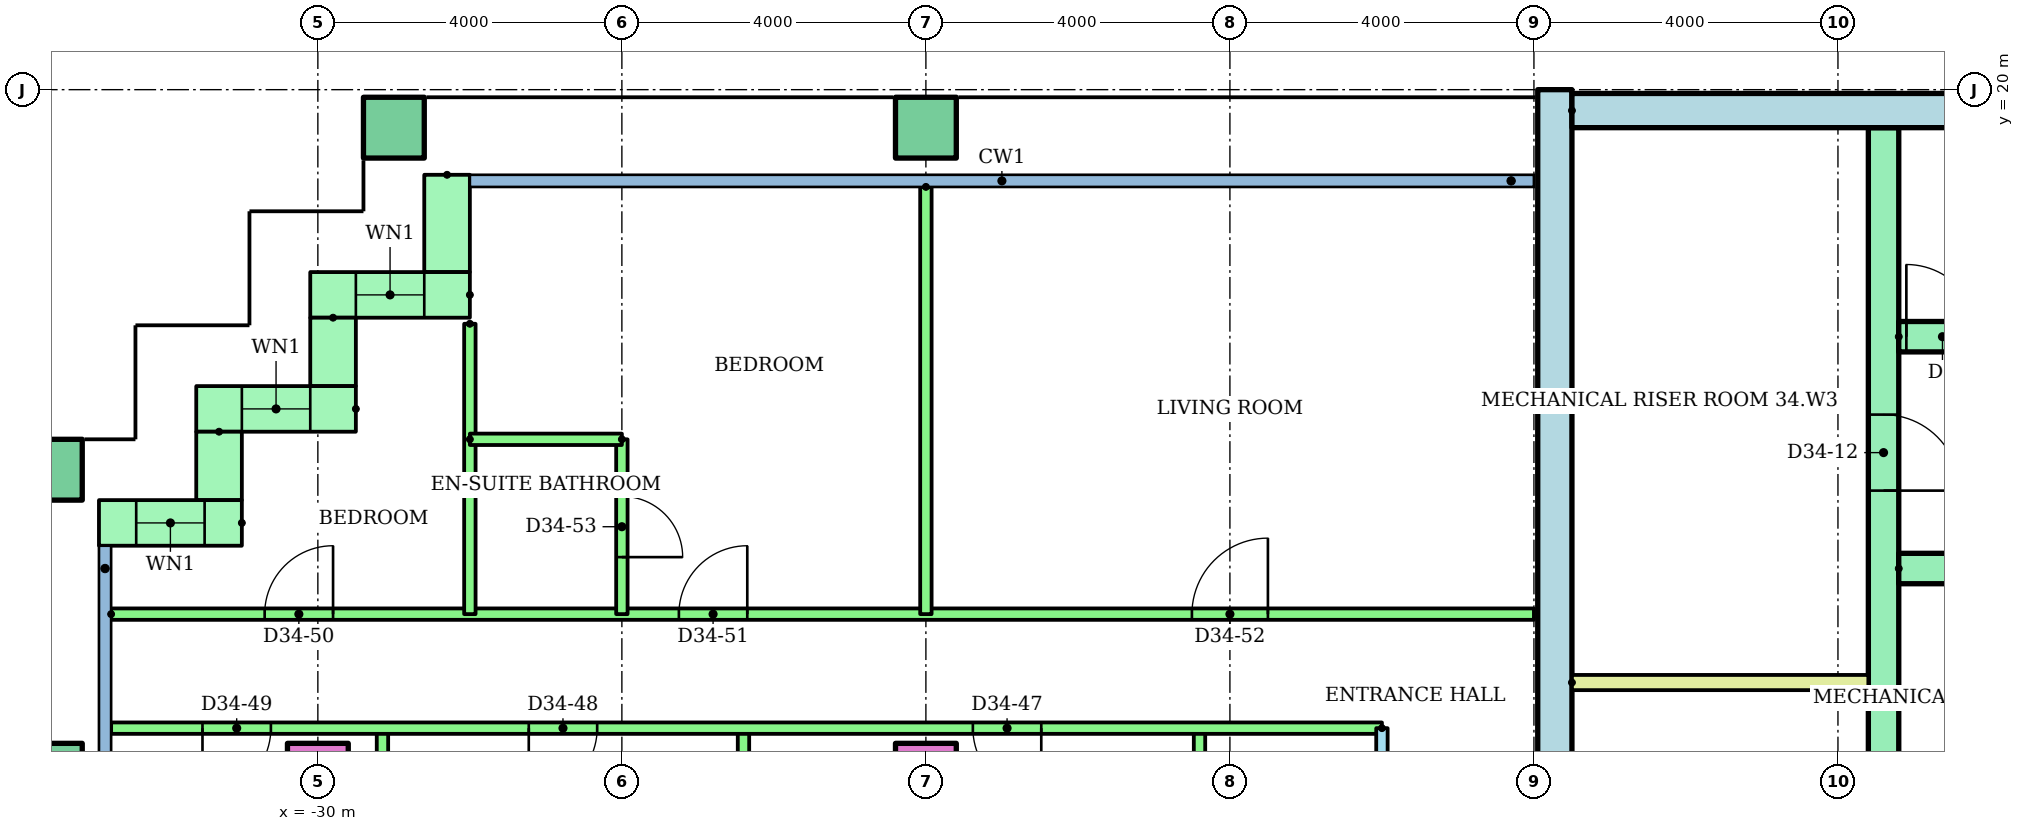
"""IFC4 building model, lengths in metres.
Left out: names, types, materials, properties, quantities, classifications, styles, units other than length and angle.
Written with IfcOpenShell. Run it as: python <this file> out.ifc"""

import sys

from ifc_helpers import new_model, si_unit, direction, frame, frame_2d, origin, origin_2d, place, context, subcontext, project, spatial, rectangle, hollow_rectangle, extrude, element, fill, save


model = new_model("IFC4")
c1 = context("Model", 3, precision=1e-05, world=origin(), true_north=direction((0.0, 1.0)))
c2 = subcontext(c1, "Body", "Model", "MODEL_VIEW")
j1 = project(units=[si_unit("LENGTHUNIT", "METRE"), si_unit("PLANEANGLEUNIT", "RADIAN")], contexts=[c1])
p1 = place(None, origin())
s1 = spatial("IfcSite", under=j1, at=p1, CompositionType="ELEMENT")
p2 = place(p1, origin())
s2 = spatial("IfcBuilding", under=s1, at=p2, CompositionType="ELEMENT")
p3 = place(p2, frame((0.0, 0.0, 132.6)))
s3 = spatial("IfcBuildingStorey", under=s2, at=p3, CompositionType="ELEMENT", Elevation=132.6)
p4 = place(p3, frame((-33.5, 11.0, 0.0)))
e1 = element("IfcColumn", 1, at=p4, inside=s3, PredefinedType="COLUMN", context=c2, shape_type="SweptSolid", body=[
    extrude(hollow_rectangle(XDim=0.8, YDim=0.8, WallThickness=0.04, at=origin_2d()), origin(), (0.0, 0.0, 1.0), 3.2),
])
for number, where in (
    (2, (-30.0, 11.0, 0.0)),
    (3, (-22.0, 11.0, 0.0)),
):
    element("IfcColumn", number, at=place(p3, frame(where)), inside=s3, PredefinedType="COLUMN", context=c2, shape_type="SweptSolid", body=[
        extrude(rectangle(XDim=0.8, YDim=0.8, at=origin_2d()), origin(), (0.0, 0.0, 1.0), 3.2),
    ])
for number, where in (
    (4, (-33.5, 15.0, 0.0)),
    (5, (-29.0, 19.5, 0.0)),
    (6, (-22.0, 19.5, 0.0)),
):
    element("IfcColumn", number, at=place(p3, frame(where)), inside=s3, PredefinedType="COLUMN", context=c2, shape_type="SweptSolid", body=[
        extrude(hollow_rectangle(XDim=0.8, YDim=0.8, WallThickness=0.04, at=origin_2d()), origin(), (0.0, 0.0, 1.0), 3.2),
    ])
p5 = place(p3, frame((-28.3, 18.88, 0.0), z_axis=(0.0, 0.0, 1.0), x_axis=(0.0, -1.0, 0.0)))
e7 = element("IfcWall", 7, at=p5, inside=s3, PredefinedType="STANDARD", context=c2, shape_type="SweptSolid", body=[
    extrude(rectangle(XDim=1.28, YDim=0.6, at=frame_2d((0.64, 0.0))), origin(), (0.0, 0.0, 1.0), 2.92),
])
p6 = place(p3, frame((-28.0, 17.3, 0.0), z_axis=(0.0, 0.0, 1.0), x_axis=(-1.0, 0.0, 0.0)))
e8 = element("IfcWall", 8, at=p6, inside=s3, PredefinedType="STANDARD", context=c2, shape_type="SweptSolid", body=[
    extrude(rectangle(XDim=2.1, YDim=0.6, at=frame_2d((1.05, 0.0))), origin(), (0.0, 0.0, 1.0), 2.92),
])
p7 = place(p6, frame((0.6, 0.0, 0.9)))
e9 = element("IfcOpeningElement", 9, at=p7, cuts=e8, PredefinedType="OPENING", context=c2, shape_type="SweptSolid", body=[
    extrude(rectangle(XDim=0.9, YDim=1.5, at=frame_2d((0.45, 0.75))), frame((0.0, 0.31, 0.0), z_axis=(0.0, -1.0, 0.0), x_axis=(1.0, 0.0, 0.0)), (0.0, 0.0, 1.0), 0.62),
])
p8 = place(p3, frame((-29.8, 17.0, 0.0), z_axis=(0.0, 0.0, 1.0), x_axis=(0.0, -1.0, 0.0)))
e10 = element("IfcWall", 10, at=p8, inside=s3, PredefinedType="STANDARD", context=c2, shape_type="SweptSolid", body=[
    extrude(rectangle(XDim=0.9, YDim=0.6, at=frame_2d((0.45, 0.0))), origin(), (0.0, 0.0, 1.0), 2.92),
])
p9 = place(p3, frame((-29.5, 15.8, 0.0), z_axis=(0.0, 0.0, 1.0), x_axis=(-1.0, 0.0, 0.0)))
e11 = element("IfcWall", 11, at=p9, inside=s3, PredefinedType="STANDARD", context=c2, shape_type="SweptSolid", body=[
    extrude(rectangle(XDim=2.1, YDim=0.6, at=frame_2d((1.05, 0.0))), origin(), (0.0, 0.0, 1.0), 2.92),
])
p10 = place(p9, frame((0.6, 0.0, 0.9)))
e12 = element("IfcOpeningElement", 12, at=p10, cuts=e11, PredefinedType="OPENING", context=c2, shape_type="SweptSolid", body=[
    extrude(rectangle(XDim=0.9, YDim=1.5, at=frame_2d((0.45, 0.75))), frame((0.0, 0.31, 0.0), z_axis=(0.0, -1.0, 0.0), x_axis=(1.0, 0.0, 0.0)), (0.0, 0.0, 1.0), 0.62),
])
p11 = place(p3, frame((-31.3, 15.5, 0.0), z_axis=(0.0, 0.0, 1.0), x_axis=(0.0, -1.0, 0.0)))
e13 = element("IfcWall", 13, at=p11, inside=s3, PredefinedType="STANDARD", context=c2, shape_type="SweptSolid", body=[
    extrude(rectangle(XDim=0.9, YDim=0.6, at=frame_2d((0.45, 0.0))), origin(), (0.0, 0.0, 1.0), 2.92),
])
p12 = place(p3, frame((-31.0, 14.3, 0.0), z_axis=(0.0, 0.0, 1.0), x_axis=(-1.0, 0.0, 0.0)))
e14 = element("IfcWall", 14, at=p12, inside=s3, PredefinedType="STANDARD", context=c2, shape_type="SweptSolid", body=[
    extrude(rectangle(XDim=1.88, YDim=0.6, at=frame_2d((0.94, 0.0))), origin(), (0.0, 0.0, 1.0), 2.92),
])
p13 = place(p12, frame((0.49, 0.0, 0.9)))
e15 = element("IfcOpeningElement", 15, at=p13, cuts=e14, PredefinedType="OPENING", context=c2, shape_type="SweptSolid", body=[
    extrude(rectangle(XDim=0.9, YDim=1.5, at=frame_2d((0.45, 0.75))), frame((0.0, 0.31, 0.0), z_axis=(0.0, -1.0, 0.0), x_axis=(1.0, 0.0, 0.0)), (0.0, 0.0, 1.0), 0.62),
])
p14 = place(p3, frame((-13.725, 3.0, 0.0), z_axis=(0.0, 0.0, 1.0), x_axis=(0.0, 1.0, 0.0)))
e16 = element("IfcWall", 16, at=p14, inside=s3, PredefinedType="SHEAR", context=c2, shape_type="SweptSolid", body=[
    extrude(rectangle(XDim=17.0, YDim=0.45, at=frame_2d((8.5, 0.0))), origin(), (0.0, 0.0, 1.0), 2.92),
])
p15 = place(p3, frame((-13.5, 19.725, 0.0)))
e17 = element("IfcWall", 17, at=p15, inside=s3, PredefinedType="SHEAR", context=c2, shape_type="SweptSolid", body=[
    extrude(rectangle(XDim=27.0, YDim=0.45, at=frame_2d((13.5, 0.0))), origin(), (0.0, 0.0, 1.0), 2.92),
])
p16 = place(p3, frame((-9.4, 6.8, 0.0), z_axis=(0.0, 0.0, 1.0), x_axis=(0.0, 1.0, 0.0)))
e18 = element("IfcWall", 18, at=p16, inside=s3, PredefinedType="SHEAR", context=c2, shape_type="SweptSolid", body=[
    extrude(rectangle(XDim=12.7, YDim=0.4, at=frame_2d((6.35, 0.0))), origin(), (0.0, 0.0, 1.0), 2.92),
])
p17 = place(p16, frame((0.3, 0.0, 0.0)))
e19 = element("IfcOpeningElement", 19, at=p17, cuts=e18, PredefinedType="OPENING", context=c2, shape_type="SweptSolid", body=[
    extrude(rectangle(XDim=1.0, YDim=2.1, at=frame_2d((0.5, 1.05))), frame((0.0, 0.21, 0.0), z_axis=(0.0, -1.0, 0.0), x_axis=(1.0, 0.0, 0.0)), (0.0, 0.0, 1.0), 0.42),
])
p18 = place(p16, frame((2.05, 0.0, 0.0)))
e20 = element("IfcOpeningElement", 20, at=p18, cuts=e18, PredefinedType="OPENING", context=c2, shape_type="SweptSolid", body=[
    extrude(rectangle(XDim=1.0, YDim=2.1, at=frame_2d((0.5, 1.05))), frame((0.0, 0.21, 0.0), z_axis=(0.0, -1.0, 0.0), x_axis=(1.0, 0.0, 0.0)), (0.0, 0.0, 1.0), 0.42),
])
p19 = place(p16, frame((7.925, 0.0, 0.0)))
e21 = element("IfcOpeningElement", 21, at=p19, cuts=e18, PredefinedType="OPENING", context=c2, shape_type="SweptSolid", body=[
    extrude(rectangle(XDim=1.0, YDim=2.1, at=frame_2d((0.5, 1.05))), frame((0.0, 0.21, 0.0), z_axis=(0.0, -1.0, 0.0), x_axis=(1.0, 0.0, 0.0)), (0.0, 0.0, 1.0), 0.42),
])
p20 = place(p3, frame((-9.2, 13.7, 0.0)))
e22 = element("IfcWall", 22, at=p20, inside=s3, PredefinedType="SHEAR", context=c2, shape_type="SweptSolid", body=[
    extrude(rectangle(XDim=8.0, YDim=0.4, at=frame_2d((4.0, 0.0))), origin(), (0.0, 0.0, 1.0), 2.92),
])
p21 = place(p3, frame((-9.2, 16.75, 0.0)))
e23 = element("IfcWall", 23, at=p21, inside=s3, PredefinedType="SHEAR", context=c2, shape_type="SweptSolid", body=[
    extrude(rectangle(XDim=18.4, YDim=0.4, at=frame_2d((9.2, 0.0))), origin(), (0.0, 0.0, 1.0), 2.92),
])
p22 = place(p21, frame((0.1, 0.0, 0.0)))
e24 = element("IfcOpeningElement", 24, at=p22, cuts=e23, PredefinedType="OPENING", context=c2, shape_type="SweptSolid", body=[
    extrude(rectangle(XDim=0.95, YDim=2.1, at=frame_2d((0.475, 1.05))), frame((0.0, 0.21, 0.0), z_axis=(0.0, -1.0, 0.0), x_axis=(1.0, 0.0, 0.0)), (0.0, 0.0, 1.0), 0.42),
])
p23 = place(p21, frame((6.1, 0.0, 0.0)))
e25 = element("IfcOpeningElement", 25, at=p23, cuts=e23, PredefinedType="OPENING", context=c2, shape_type="SweptSolid", body=[
    extrude(rectangle(XDim=0.95, YDim=2.1, at=frame_2d((0.475, 1.05))), frame((0.0, 0.21, 0.0), z_axis=(0.0, -1.0, 0.0), x_axis=(1.0, 0.0, 0.0)), (0.0, 0.0, 1.0), 0.42),
])
p24 = place(p21, frame((12.1, 0.0, 0.0)))
e26 = element("IfcOpeningElement", 26, at=p24, cuts=e23, PredefinedType="OPENING", context=c2, shape_type="SweptSolid", body=[
    extrude(rectangle(XDim=0.95, YDim=2.1, at=frame_2d((0.475, 1.05))), frame((0.0, 0.21, 0.0), z_axis=(0.0, -1.0, 0.0), x_axis=(1.0, 0.0, 0.0)), (0.0, 0.0, 1.0), 0.42),
])
p25 = place(p3, frame((-13.5, 12.2, 0.0)))
e27 = element("IfcWall", 27, at=p25, inside=s3, PredefinedType="PARTITIONING", context=c2, shape_type="SweptSolid", body=[
    extrude(rectangle(XDim=3.9, YDim=0.2, at=frame_2d((1.95, 0.0))), origin(), (0.0, 0.0, 1.0), 2.92),
])
p26 = place(p3, frame((-16.0, 1.4, 0.0), z_axis=(0.0, 0.0, 1.0), x_axis=(0.0, 1.0, 0.0)))
e28 = element("IfcWall", 28, at=p26, inside=s3, PredefinedType="PARTITIONING", context=c2, shape_type="SweptSolid", body=[
    extrude(rectangle(XDim=10.2, YDim=0.15, at=frame_2d((5.1, 0.0))), origin(), (0.0, 0.0, 1.0), 2.4),
])
p27 = place(p26, frame((2.3, 0.0, 0.0)))
e29 = element("IfcOpeningElement", 29, at=p27, cuts=e28, PredefinedType="OPENING", context=c2, shape_type="SweptSolid", body=[
    extrude(rectangle(XDim=0.9, YDim=2.1, at=frame_2d((0.45, 1.05))), frame((0.0, 0.085, 0.0), z_axis=(0.0, -1.0, 0.0), x_axis=(1.0, 0.0, 0.0)), (0.0, 0.0, 1.0), 0.17),
])
p28 = place(p26, frame((7.45, 0.0, 0.0)))
e30 = element("IfcOpeningElement", 30, at=p28, cuts=e28, PredefinedType="OPENING", context=c2, shape_type="SweptSolid", body=[
    extrude(rectangle(XDim=0.8, YDim=2.1, at=frame_2d((0.4, 1.05))), frame((0.0, 0.085, 0.0), z_axis=(0.0, -1.0, 0.0), x_axis=(1.0, 0.0, 0.0)), (0.0, 0.0, 1.0), 0.17),
])
for number, where, z_axis, x_axis in (
    (31, (-18.4, 1.4, 0.0), (0.0, 0.0, 1.0), (0.0, 1.0, 0.0)),
    (32, (-24.4, 1.4, 0.0), (0.0, 0.0, 1.0), (0.0, 1.0, 0.0)),
    (33, (-29.15, 1.4, 0.0), (0.0, 0.0, 1.0), (0.0, 1.0, 0.0)),
):
    element("IfcWall", number, at=place(p3, frame(where, z_axis=z_axis, x_axis=x_axis)), inside=s3, PredefinedType="PARTITIONING", context=c2, shape_type="SweptSolid", body=[
        extrude(rectangle(XDim=10.2, YDim=0.15, at=frame_2d((5.1, 0.0))), origin(), (0.0, 0.0, 1.0), 2.4),
    ])
p29 = place(p3, frame((-16.0, 11.6, 0.0), z_axis=(0.0, 0.0, 1.0), x_axis=(-1.0, 0.0, 0.0)))
e34 = element("IfcWall", 34, at=p29, inside=s3, PredefinedType="PARTITIONING", context=c2, shape_type="SweptSolid", body=[
    extrude(rectangle(XDim=16.72, YDim=0.15, at=frame_2d((8.36, 0.0))), origin(), (0.0, 0.0, 1.0), 2.4),
])
p30 = place(p29, frame((4.482, 0.0, 0.0)))
e35 = element("IfcOpeningElement", 35, at=p30, cuts=e34, PredefinedType="OPENING", context=c2, shape_type="SweptSolid", body=[
    extrude(rectangle(XDim=0.9, YDim=2.1, at=frame_2d((0.45, 1.05))), frame((0.0, 0.085, 0.0), z_axis=(0.0, -1.0, 0.0), x_axis=(1.0, 0.0, 0.0)), (0.0, 0.0, 1.0), 0.17),
])
p31 = place(p29, frame((10.325, 0.0, 0.0)))
e36 = element("IfcOpeningElement", 36, at=p31, cuts=e34, PredefinedType="OPENING", context=c2, shape_type="SweptSolid", body=[
    extrude(rectangle(XDim=0.9, YDim=2.1, at=frame_2d((0.45, 1.05))), frame((0.0, 0.085, 0.0), z_axis=(0.0, -1.0, 0.0), x_axis=(1.0, 0.0, 0.0)), (0.0, 0.0, 1.0), 0.17),
])
p32 = place(p29, frame((14.618, 0.0, 0.0)))
e37 = element("IfcOpeningElement", 37, at=p32, cuts=e34, PredefinedType="OPENING", context=c2, shape_type="SweptSolid", body=[
    extrude(rectangle(XDim=0.9, YDim=2.1, at=frame_2d((0.45, 1.05))), frame((0.0, 0.085, 0.0), z_axis=(0.0, -1.0, 0.0), x_axis=(1.0, 0.0, 0.0)), (0.0, 0.0, 1.0), 0.17),
])
p33 = place(p3, frame((-32.72, 13.1, 0.0)))
e38 = element("IfcWall", 38, at=p33, inside=s3, PredefinedType="PARTITIONING", context=c2, shape_type="SweptSolid", body=[
    extrude(rectangle(XDim=18.72, YDim=0.15, at=frame_2d((9.36, 0.0))), origin(), (0.0, 0.0, 1.0), 2.4),
])
p34 = place(p33, frame((2.02, 0.0, 0.0)))
e39 = element("IfcOpeningElement", 39, at=p34, cuts=e38, PredefinedType="OPENING", context=c2, shape_type="SweptSolid", body=[
    extrude(rectangle(XDim=0.9, YDim=2.1, at=frame_2d((0.45, 1.05))), frame((0.0, 0.085, 0.0), z_axis=(0.0, -1.0, 0.0), x_axis=(1.0, 0.0, 0.0)), (0.0, 0.0, 1.0), 0.17),
])
p35 = place(p33, frame((7.47, 0.0, 0.0)))
e40 = element("IfcOpeningElement", 40, at=p35, cuts=e38, PredefinedType="OPENING", context=c2, shape_type="SweptSolid", body=[
    extrude(rectangle(XDim=0.9, YDim=2.1, at=frame_2d((0.45, 1.05))), frame((0.0, 0.085, 0.0), z_axis=(0.0, -1.0, 0.0), x_axis=(1.0, 0.0, 0.0)), (0.0, 0.0, 1.0), 0.17),
])
p36 = place(p33, frame((14.22, 0.0, 0.0)))
e41 = element("IfcOpeningElement", 41, at=p36, cuts=e38, PredefinedType="OPENING", context=c2, shape_type="SweptSolid", body=[
    extrude(rectangle(XDim=1.0, YDim=2.1, at=frame_2d((0.5, 1.05))), frame((0.0, 0.085, 0.0), z_axis=(0.0, -1.0, 0.0), x_axis=(1.0, 0.0, 0.0)), (0.0, 0.0, 1.0), 0.17),
])
p37 = place(p3, frame((-28.0, 16.92, 0.0), z_axis=(0.0, 0.0, 1.0), x_axis=(0.0, -1.0, 0.0)))
e42 = element("IfcWall", 42, at=p37, inside=s3, PredefinedType="PARTITIONING", context=c2, shape_type="SweptSolid", body=[
    extrude(rectangle(XDim=3.82, YDim=0.15, at=frame_2d((1.91, 0.0))), origin(), (0.0, 0.0, 1.0), 2.4),
])
p38 = place(p3, frame((-22.0, 18.721, 0.0), z_axis=(0.0, 0.0, 1.0), x_axis=(0.0, -1.0, 0.0)))
e43 = element("IfcWall", 43, at=p38, inside=s3, PredefinedType="PARTITIONING", context=c2, shape_type="SweptSolid", body=[
    extrude(rectangle(XDim=5.621, YDim=0.15, at=frame_2d((2.811, 0.0))), origin(), (0.0, 0.0, 1.0), 2.4),
])
p39 = place(p3, frame((-26.0, 15.4, 0.0), z_axis=(0.0, 0.0, 1.0), x_axis=(0.0, -1.0, 0.0)))
e44 = element("IfcWall", 44, at=p39, inside=s3, PredefinedType="PARTITIONING", context=c2, shape_type="SweptSolid", body=[
    extrude(rectangle(XDim=2.3, YDim=0.15, at=frame_2d((1.15, 0.0))), origin(), (0.0, 0.0, 1.0), 2.4),
])
p40 = place(p39, frame((0.75, 0.0, 0.0)))
e45 = element("IfcOpeningElement", 45, at=p40, cuts=e44, PredefinedType="OPENING", context=c2, shape_type="SweptSolid", body=[
    extrude(rectangle(XDim=0.8, YDim=2.1, at=frame_2d((0.4, 1.05))), frame((0.0, 0.085, 0.0), z_axis=(0.0, -1.0, 0.0), x_axis=(1.0, 0.0, 0.0)), (0.0, 0.0, 1.0), 0.17),
])
p41 = place(p3, frame((-28.0, 15.4, 0.0)))
e46 = element("IfcWall", 46, at=p41, inside=s3, PredefinedType="PARTITIONING", context=c2, shape_type="SweptSolid", body=[
    extrude(rectangle(XDim=2.0, YDim=0.15, at=frame_2d((1.0, 0.0))), origin(), (0.0, 0.0, 1.0), 2.4),
])
p42 = place(p7, origin())
e47 = element("IfcWindow", 47, at=p42, inside=s3, PartitioningType="SINGLE_PANEL", PredefinedType="WINDOW", context=c2, shape_type="SweptSolid", body=[
    extrude(rectangle(XDim=0.9, YDim=1.5, at=frame_2d((0.45, 0.75))), frame((0.0, 0.03, 0.0), z_axis=(0.0, -1.0, 0.0), x_axis=(1.0, 0.0, 0.0)), (0.0, 0.0, 1.0), 0.06),
])
fill(e9, e47)
p43 = place(p10, origin())
e48 = element("IfcWindow", 48, at=p43, inside=s3, PartitioningType="SINGLE_PANEL", PredefinedType="WINDOW", context=c2, shape_type="SweptSolid", body=[
    extrude(rectangle(XDim=0.9, YDim=1.5, at=frame_2d((0.45, 0.75))), frame((0.0, 0.03, 0.0), z_axis=(0.0, -1.0, 0.0), x_axis=(1.0, 0.0, 0.0)), (0.0, 0.0, 1.0), 0.06),
])
fill(e12, e48)
p44 = place(p13, origin())
e49 = element("IfcWindow", 49, at=p44, inside=s3, PartitioningType="SINGLE_PANEL", PredefinedType="WINDOW", context=c2, shape_type="SweptSolid", body=[
    extrude(rectangle(XDim=0.9, YDim=1.5, at=frame_2d((0.45, 0.75))), frame((0.0, 0.03, 0.0), z_axis=(0.0, -1.0, 0.0), x_axis=(1.0, 0.0, 0.0)), (0.0, 0.0, 1.0), 0.06),
])
fill(e15, e49)
p45 = place(p22, origin())
e50 = element("IfcDoor", 50, at=p45, inside=s3, OperationType="SINGLE_SWING_LEFT", PredefinedType="DOOR", context=c2, shape_type="SweptSolid", body=[
    extrude(rectangle(XDim=0.95, YDim=2.1, at=frame_2d((0.475, 1.05))), frame((0.0, 0.025, 0.0), z_axis=(0.0, -1.0, 0.0), x_axis=(1.0, 0.0, 0.0)), (0.0, 0.0, 1.0), 0.05),
])
fill(e24, e50)
p46 = place(p19, frame((1.0, 0.0, 0.0), z_axis=(0.0, 0.0, 1.0), x_axis=(-1.0, 0.0, 0.0)))
e51 = element("IfcDoor", 51, at=p46, inside=s3, OperationType="SINGLE_SWING_LEFT", PredefinedType="DOOR", context=c2, shape_type="SweptSolid", body=[
    extrude(rectangle(XDim=1.0, YDim=2.1, at=frame_2d((0.5, 1.05))), frame((0.0, 0.025, 0.0), z_axis=(0.0, -1.0, 0.0), x_axis=(1.0, 0.0, 0.0)), (0.0, 0.0, 1.0), 0.05),
])
fill(e21, e51)
p47 = place(p30, origin())
e52 = element("IfcDoor", 52, at=p47, inside=s3, OperationType="SINGLE_SWING_LEFT", PredefinedType="DOOR", context=c2, shape_type="SweptSolid", body=[
    extrude(rectangle(XDim=0.9, YDim=2.1, at=frame_2d((0.45, 1.05))), frame((0.0, 0.025, 0.0), z_axis=(0.0, -1.0, 0.0), x_axis=(1.0, 0.0, 0.0)), (0.0, 0.0, 1.0), 0.05),
])
fill(e35, e52)
p48 = place(p31, origin())
e53 = element("IfcDoor", 53, at=p48, inside=s3, OperationType="SINGLE_SWING_RIGHT", PredefinedType="DOOR", context=c2, shape_type="SweptSolid", body=[
    extrude(rectangle(XDim=0.9, YDim=2.1, at=frame_2d((0.45, 1.05))), frame((0.0, 0.025, 0.0), z_axis=(0.0, -1.0, 0.0), x_axis=(1.0, 0.0, 0.0)), (0.0, 0.0, 1.0), 0.05),
])
fill(e36, e53)
p49 = place(p32, origin())
e54 = element("IfcDoor", 54, at=p49, inside=s3, OperationType="SINGLE_SWING_RIGHT", PredefinedType="DOOR", context=c2, shape_type="SweptSolid", body=[
    extrude(rectangle(XDim=0.9, YDim=2.1, at=frame_2d((0.45, 1.05))), frame((0.0, 0.025, 0.0), z_axis=(0.0, -1.0, 0.0), x_axis=(1.0, 0.0, 0.0)), (0.0, 0.0, 1.0), 0.05),
])
fill(e37, e54)
p50 = place(p34, origin())
e55 = element("IfcDoor", 55, at=p50, inside=s3, OperationType="SINGLE_SWING_RIGHT", PredefinedType="DOOR", context=c2, shape_type="SweptSolid", body=[
    extrude(rectangle(XDim=0.9, YDim=2.1, at=frame_2d((0.45, 1.05))), frame((0.0, 0.025, 0.0), z_axis=(0.0, -1.0, 0.0), x_axis=(1.0, 0.0, 0.0)), (0.0, 0.0, 1.0), 0.05),
])
fill(e39, e55)
p51 = place(p35, origin())
e56 = element("IfcDoor", 56, at=p51, inside=s3, OperationType="SINGLE_SWING_RIGHT", PredefinedType="DOOR", context=c2, shape_type="SweptSolid", body=[
    extrude(rectangle(XDim=0.9, YDim=2.1, at=frame_2d((0.45, 1.05))), frame((0.0, 0.025, 0.0), z_axis=(0.0, -1.0, 0.0), x_axis=(1.0, 0.0, 0.0)), (0.0, 0.0, 1.0), 0.05),
])
fill(e40, e56)
p52 = place(p36, origin())
e57 = element("IfcDoor", 57, at=p52, inside=s3, OperationType="SINGLE_SWING_RIGHT", PredefinedType="DOOR", context=c2, shape_type="SweptSolid", body=[
    extrude(rectangle(XDim=1.0, YDim=2.1, at=frame_2d((0.5, 1.05))), frame((0.0, 0.025, 0.0), z_axis=(0.0, -1.0, 0.0), x_axis=(1.0, 0.0, 0.0)), (0.0, 0.0, 1.0), 0.05),
])
fill(e41, e57)
p53 = place(p40, origin())
e58 = element("IfcDoor", 58, at=p53, inside=s3, OperationType="SINGLE_SWING_RIGHT", PredefinedType="DOOR", context=c2, shape_type="SweptSolid", body=[
    extrude(rectangle(XDim=0.8, YDim=2.1, at=frame_2d((0.4, 1.05))), frame((0.0, 0.025, 0.0), z_axis=(0.0, -1.0, 0.0), x_axis=(1.0, 0.0, 0.0)), (0.0, 0.0, 1.0), 0.05),
])
fill(e45, e58)
save(model, sys.argv[1])
